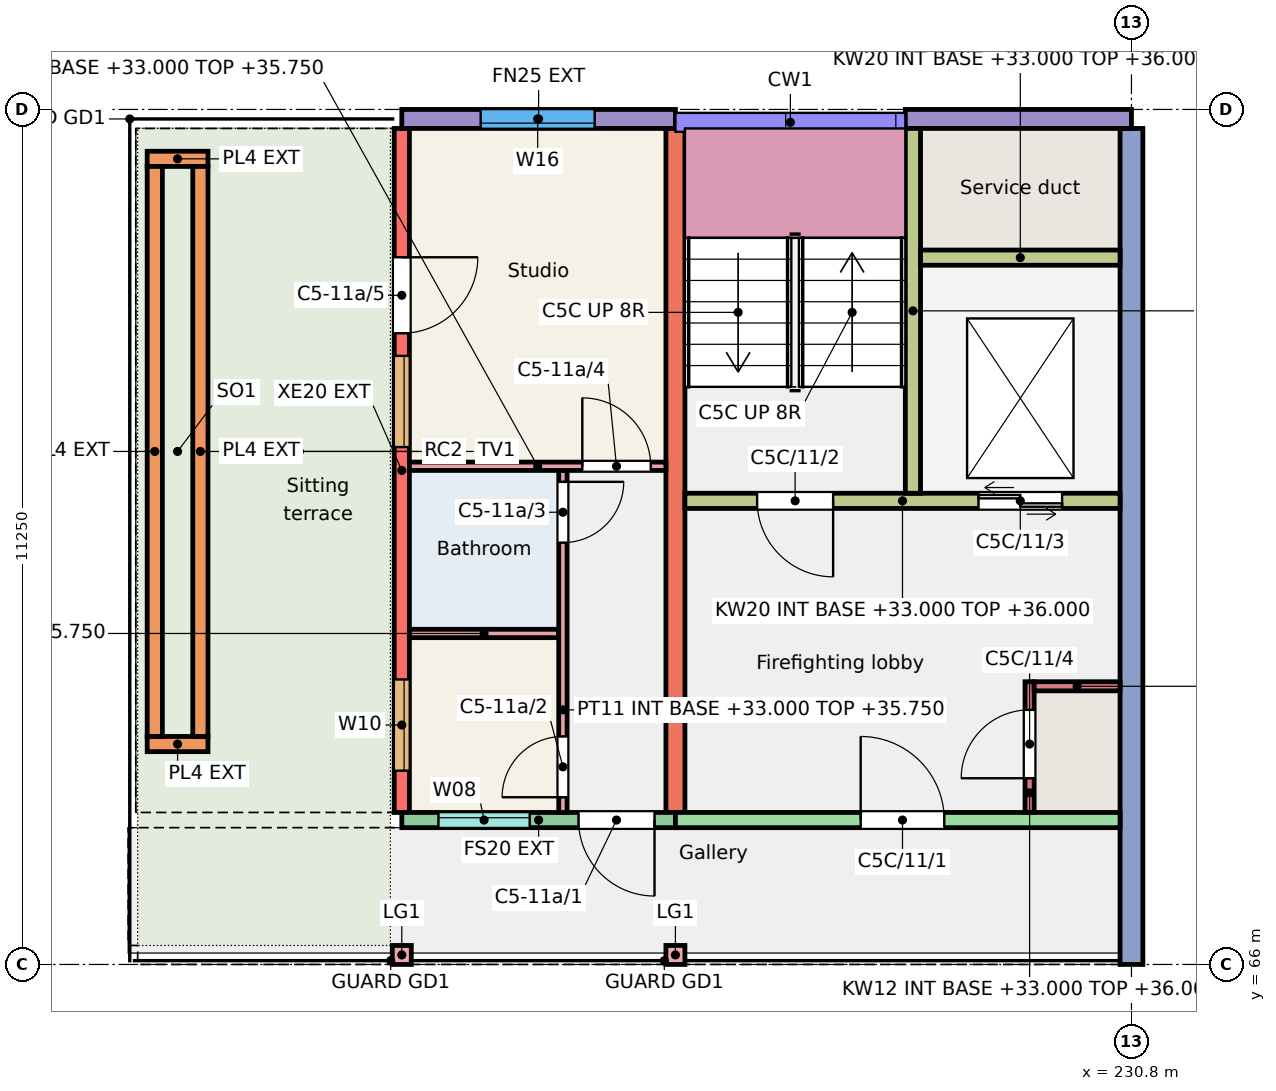
"""IFC4 building model, lengths in metres.
Left out: names, types, materials, properties, quantities, classifications, styles, units other than length and angle.
Written with IfcOpenShell. Run it as: python <this file> out.ifc"""

import sys

from ifc_helpers import new_model, si_unit, direction, frame, frame_2d, origin, origin_2d, place, context, subcontext, project, spatial, rectangle, extrude, element, fill, save


model = new_model("IFC4")
c1 = context("Model", 3, precision=1e-05, world=origin(), true_north=direction((0.0, 1.0)))
c2 = subcontext(c1, "Body", "Model", "MODEL_VIEW")
j1 = project(units=[si_unit("LENGTHUNIT", "METRE"), si_unit("PLANEANGLEUNIT", "RADIAN")], contexts=[c1])
p1 = place(None, origin())
s1 = spatial("IfcSite", under=j1, at=p1, CompositionType="ELEMENT")
p2 = place(p1, origin())
s2 = spatial("IfcBuilding", under=s1, at=p2, CompositionType="ELEMENT")
p3 = place(p2, frame((0.0, 0.0, 33.0)))
s3 = spatial("IfcBuildingStorey", under=s2, at=p3, CompositionType="ELEMENT", Elevation=33.0)
p4 = place(p3, frame((221.2, 68.0, 0.0), z_axis=(0.0, 0.0, 1.0), x_axis=(0.0, 1.0, 0.0)))
e1 = element("IfcWall", 1, at=p4, inside=s3, PredefinedType="SHEAR", context=c2, shape_type="SweptSolid", body=[
    extrude(rectangle(XDim=9.0, YDim=0.2, at=frame_2d((4.5, 0.0))), origin(), (0.0, 0.0, 1.0), 3.0),
])
p5 = place(p4, frame((0.55, 0.0, 0.9)))
e2 = element("IfcOpeningElement", 2, at=p5, cuts=e1, PredefinedType="OPENING", context=c2, shape_type="SweptSolid", body=[
    extrude(rectangle(XDim=1.2, YDim=1.5, at=frame_2d((0.6, 0.75))), frame((0.0, 0.11, 0.0), z_axis=(0.0, -1.0, 0.0), x_axis=(1.0, 0.0, 0.0)), (0.0, 0.0, 1.0), 0.22),
])
p6 = place(p4, frame((4.808, 0.0, 0.9)))
e3 = element("IfcOpeningElement", 3, at=p6, cuts=e1, PredefinedType="OPENING", context=c2, shape_type="SweptSolid", body=[
    extrude(rectangle(XDim=1.2, YDim=1.5, at=frame_2d((0.6, 0.75))), frame((0.0, 0.11, 0.0), z_axis=(0.0, -1.0, 0.0), x_axis=(1.0, 0.0, 0.0)), (0.0, 0.0, 1.0), 0.22),
])
p7 = place(p4, frame((6.305, 0.0, 0.0)))
e4 = element("IfcOpeningElement", 4, at=p7, cuts=e1, PredefinedType="OPENING", context=c2, shape_type="SweptSolid", body=[
    extrude(rectangle(XDim=1.0, YDim=2.1, at=frame_2d((0.5, 1.05))), frame((0.0, 0.11, 0.0), z_axis=(0.0, -1.0, 0.0), x_axis=(1.0, 0.0, 0.0)), (0.0, 0.0, 1.0), 0.22),
])
p8 = place(p3, frame((224.8, 68.0, 0.0), z_axis=(0.0, 0.0, 1.0), x_axis=(0.0, 1.0, 0.0)))
e5 = element("IfcWall", 5, at=p8, inside=s3, PredefinedType="SHEAR", context=c2, shape_type="SweptSolid", body=[
    extrude(rectangle(XDim=9.0, YDim=0.25, at=frame_2d((4.5, 0.0))), origin(), (0.0, 0.0, 1.0), 3.0),
])
p9 = place(p3, frame((230.8, 66.0, 0.0), z_axis=(0.0, 0.0, 1.0), x_axis=(0.0, 1.0, 0.0)))
e6 = element("IfcWall", 6, at=p9, inside=s3, PredefinedType="SHEAR", context=c2, shape_type="SweptSolid", body=[
    extrude(rectangle(XDim=11.0, YDim=0.3, at=frame_2d((5.5, 0.0))), origin(), (0.0, 0.0, 1.0), 3.0),
])
p10 = place(p3, frame((221.2, 77.125, 0.0), z_axis=(0.0, 0.0, 1.0), x_axis=(1.0, 0.0, 0.0)))
e7 = element("IfcWall", 7, at=p10, inside=s3, PredefinedType="SOLIDWALL", context=c2, shape_type="SweptSolid", body=[
    extrude(rectangle(XDim=3.6, YDim=0.25, at=frame_2d((1.8, 0.0))), origin(), (0.0, 0.0, 1.0), 3.0),
])
p11 = place(p10, frame((1.038, 0.0, 0.9)))
e8 = element("IfcOpeningElement", 8, at=p11, cuts=e7, PredefinedType="OPENING", context=c2, shape_type="SweptSolid", body=[
    extrude(rectangle(XDim=1.5, YDim=1.5, at=frame_2d((0.75, 0.75))), frame((0.0, 0.135, 0.0), z_axis=(0.0, -1.0, 0.0), x_axis=(1.0, 0.0, 0.0)), (0.0, 0.0, 1.0), 0.27),
])
p12 = place(p3, frame((221.2, 67.9, 0.0), z_axis=(0.0, 0.0, 1.0), x_axis=(1.0, 0.0, 0.0)))
e9 = element("IfcWall", 9, at=p12, inside=s3, PredefinedType="SOLIDWALL", context=c2, shape_type="SweptSolid", body=[
    extrude(rectangle(XDim=3.6, YDim=0.2, at=frame_2d((1.8, 0.0))), origin(), (0.0, 0.0, 1.0), 3.0),
])
p13 = place(p12, frame((0.482, 0.0, 1.1)))
e10 = element("IfcOpeningElement", 10, at=p13, cuts=e9, PredefinedType="OPENING", context=c2, shape_type="SweptSolid", body=[
    extrude(rectangle(XDim=1.2, YDim=1.3, at=frame_2d((0.6, 0.65))), frame((0.0, 0.11, 0.0), z_axis=(0.0, -1.0, 0.0), x_axis=(1.0, 0.0, 0.0)), (0.0, 0.0, 1.0), 0.22),
])
p14 = place(p12, frame((2.325, 0.0, 0.0)))
e11 = element("IfcOpeningElement", 11, at=p14, cuts=e9, PredefinedType="OPENING", context=c2, shape_type="SweptSolid", body=[
    extrude(rectangle(XDim=1.0, YDim=2.1, at=frame_2d((0.5, 1.05))), frame((0.0, 0.11, 0.0), z_axis=(0.0, -1.0, 0.0), x_axis=(1.0, 0.0, 0.0)), (0.0, 0.0, 1.0), 0.22),
])
p15 = place(p3, frame((227.825, 77.125, 0.0), z_axis=(0.0, 0.0, 1.0), x_axis=(1.0, 0.0, 0.0)))
e12 = element("IfcWall", 12, at=p15, inside=s3, PredefinedType="SOLIDWALL", context=c2, shape_type="SweptSolid", body=[
    extrude(rectangle(XDim=2.975, YDim=0.25, at=frame_2d((1.488, 0.0))), origin(), (0.0, 0.0, 1.0), 3.0),
])
p16 = place(p3, frame((224.8, 67.9, 0.0), z_axis=(0.0, 0.0, 1.0), x_axis=(1.0, 0.0, 0.0)))
e13 = element("IfcWall", 13, at=p16, inside=s3, PredefinedType="SHEAR", context=c2, shape_type="SweptSolid", body=[
    extrude(rectangle(XDim=5.85, YDim=0.2, at=frame_2d((2.925, 0.0))), origin(), (0.0, 0.0, 1.0), 3.0),
])
p17 = place(p16, frame((2.438, 0.0, 0.0)))
e14 = element("IfcOpeningElement", 14, at=p17, cuts=e13, PredefinedType="OPENING", context=c2, shape_type="SweptSolid", body=[
    extrude(rectangle(XDim=1.1, YDim=2.1, at=frame_2d((0.55, 1.05))), frame((0.0, 0.11, 0.0), z_axis=(0.0, -1.0, 0.0), x_axis=(1.0, 0.0, 0.0)), (0.0, 0.0, 1.0), 0.22),
])
p18 = place(p3, frame((224.925, 72.1, 0.0), z_axis=(0.0, 0.0, 1.0), x_axis=(1.0, 0.0, 0.0)))
e15 = element("IfcWall", 15, at=p18, inside=s3, PredefinedType="SHEAR", context=c2, shape_type="SweptSolid", body=[
    extrude(rectangle(XDim=5.725, YDim=0.2, at=frame_2d((2.862, 0.0))), origin(), (0.0, 0.0, 1.0), 3.0),
])
p19 = place(p18, frame((0.95, 0.0, 0.0)))
e16 = element("IfcOpeningElement", 16, at=p19, cuts=e15, PredefinedType="OPENING", context=c2, shape_type="SweptSolid", body=[
    extrude(rectangle(XDim=1.0, YDim=2.1, at=frame_2d((0.5, 1.05))), frame((0.0, 0.11, 0.0), z_axis=(0.0, -1.0, 0.0), x_axis=(1.0, 0.0, 0.0)), (0.0, 0.0, 1.0), 0.22),
])
p20 = place(p18, frame((3.863, 0.0, 0.0)))
e17 = element("IfcOpeningElement", 17, at=p20, cuts=e15, PredefinedType="OPENING", context=c2, shape_type="SweptSolid", body=[
    extrude(rectangle(XDim=1.1, YDim=2.1, at=frame_2d((0.55, 1.05))), frame((0.0, 0.11, 0.0), z_axis=(0.0, -1.0, 0.0), x_axis=(1.0, 0.0, 0.0)), (0.0, 0.0, 1.0), 0.22),
])
p21 = place(p3, frame((227.925, 72.2, 0.0), z_axis=(0.0, 0.0, 1.0), x_axis=(0.0, 1.0, 0.0)))
e18 = element("IfcWall", 18, at=p21, inside=s3, PredefinedType="SHEAR", context=c2, shape_type="SweptSolid", body=[
    extrude(rectangle(XDim=4.8, YDim=0.2, at=frame_2d((2.4, 0.0))), origin(), (0.0, 0.0, 1.0), 3.0),
])
p22 = place(p3, frame((228.025, 75.3, 0.0), z_axis=(0.0, 0.0, 1.0), x_axis=(1.0, 0.0, 0.0)))
e19 = element("IfcWall", 19, at=p22, inside=s3, PredefinedType="SHEAR", context=c2, shape_type="SweptSolid", body=[
    extrude(rectangle(XDim=2.625, YDim=0.2, at=frame_2d((1.312, 0.0))), origin(), (0.0, 0.0, 1.0), 3.0),
])
p23 = place(p3, frame((229.46, 68.0, 0.0), z_axis=(0.0, 0.0, 1.0), x_axis=(0.0, 1.0, 0.0)))
e20 = element("IfcWall", 20, at=p23, inside=s3, PredefinedType="SHEAR", context=c2, shape_type="SweptSolid", body=[
    extrude(rectangle(XDim=1.72, YDim=0.12, at=frame_2d((0.86, 0.0))), origin(), (0.0, 0.0, 1.0), 3.0),
])
p24 = place(p23, frame((0.45, 0.0, 0.0)))
e21 = element("IfcOpeningElement", 21, at=p24, cuts=e20, PredefinedType="OPENING", context=c2, shape_type="SweptSolid", body=[
    extrude(rectangle(XDim=0.9, YDim=2.1, at=frame_2d((0.45, 1.05))), frame((0.0, 0.07, 0.0), z_axis=(0.0, -1.0, 0.0), x_axis=(1.0, 0.0, 0.0)), (0.0, 0.0, 1.0), 0.14),
])
p25 = place(p3, frame((229.52, 69.66, 0.0), z_axis=(0.0, 0.0, 1.0), x_axis=(1.0, 0.0, 0.0)))
e22 = element("IfcWall", 22, at=p25, inside=s3, PredefinedType="SHEAR", context=c2, shape_type="SweptSolid", body=[
    extrude(rectangle(XDim=1.13, YDim=0.12, at=frame_2d((0.565, 0.0))), origin(), (0.0, 0.0, 1.0), 3.0),
])
for number, where, z_axis, x_axis in (
    (23, (221.2, 66.125, 0.0), (0.0, 0.0, 1.0), (1.0, 0.0, 0.0)),
    (24, (224.8, 66.125, 0.0), (0.0, 0.0, 1.0), (1.0, 0.0, 0.0)),
):
    element("IfcColumn", number, at=place(p3, frame(where, z_axis=z_axis, x_axis=x_axis)), inside=s3, PredefinedType="COLUMN", context=c2, shape_type="SweptSolid", body=[
        extrude(rectangle(XDim=0.25, YDim=0.25, at=origin_2d()), origin(), (0.0, 0.0, 1.0), 3.0),
    ])
for number, where, z_axis, x_axis in (
    (25, (217.85, 68.9, 0.01), (0.0, 0.0, 1.0), (1.0, 0.0, 0.0)),
    (26, (217.85, 76.6, 0.01), (0.0, 0.0, 1.0), (1.0, 0.0, 0.0)),
):
    element("IfcWall", number, at=place(p3, frame(where, z_axis=z_axis, x_axis=x_axis)), inside=s3, PredefinedType="SOLIDWALL", context=c2, shape_type="SweptSolid", body=[
        extrude(rectangle(XDim=0.8, YDim=0.2, at=frame_2d((0.4, 0.0))), origin(), (0.0, 0.0, 1.0), 0.45),
    ])
for number, where, z_axis, x_axis in (
    (27, (217.95, 69.0, 0.01), (0.0, 0.0, 1.0), (0.0, 1.0, 0.0)),
    (28, (218.55, 69.0, 0.01), (0.0, 0.0, 1.0), (0.0, 1.0, 0.0)),
):
    element("IfcWall", number, at=place(p3, frame(where, z_axis=z_axis, x_axis=x_axis)), inside=s3, PredefinedType="SOLIDWALL", context=c2, shape_type="SweptSolid", body=[
        extrude(rectangle(XDim=7.5, YDim=0.2, at=frame_2d((3.75, 0.0))), origin(), (0.0, 0.0, 1.0), 0.45),
    ])
p26 = place(p3, frame((221.3, 70.355, 0.0), z_axis=(0.0, 0.0, 1.0), x_axis=(1.0, 0.0, 0.0)))
e29 = element("IfcWall", 29, at=p26, inside=s3, PredefinedType="PARTITIONING", context=c2, shape_type="SweptSolid", body=[
    extrude(rectangle(XDim=1.965, YDim=0.11, at=frame_2d((0.982, 0.0))), origin(), (0.0, 0.0, 1.0), 2.75),
])
p27 = place(p3, frame((223.32, 68.0, 0.0), z_axis=(0.0, 0.0, 1.0), x_axis=(0.0, 1.0, 0.0)))
e30 = element("IfcWall", 30, at=p27, inside=s3, PredefinedType="PARTITIONING", context=c2, shape_type="SweptSolid", body=[
    extrude(rectangle(XDim=4.5, YDim=0.11, at=frame_2d((2.25, 0.0))), origin(), (0.0, 0.0, 1.0), 2.75),
])
p28 = place(p27, frame((0.2, 0.0, 0.0)))
e31 = element("IfcOpeningElement", 31, at=p28, cuts=e30, PredefinedType="OPENING", context=c2, shape_type="SweptSolid", body=[
    extrude(rectangle(XDim=0.8, YDim=2.1, at=frame_2d((0.4, 1.05))), frame((0.0, 0.065, 0.0), z_axis=(0.0, -1.0, 0.0), x_axis=(1.0, 0.0, 0.0)), (0.0, 0.0, 1.0), 0.13),
])
p29 = place(p27, frame((3.55, 0.0, 0.0)))
e32 = element("IfcOpeningElement", 32, at=p29, cuts=e30, PredefinedType="OPENING", context=c2, shape_type="SweptSolid", body=[
    extrude(rectangle(XDim=0.8, YDim=2.1, at=frame_2d((0.4, 1.05))), frame((0.0, 0.065, 0.0), z_axis=(0.0, -1.0, 0.0), x_axis=(1.0, 0.0, 0.0)), (0.0, 0.0, 1.0), 0.13),
])
p30 = place(p3, frame((221.3, 72.555, 0.0), z_axis=(0.0, 0.0, 1.0), x_axis=(1.0, 0.0, 0.0)))
e33 = element("IfcWall", 33, at=p30, inside=s3, PredefinedType="PARTITIONING", context=c2, shape_type="SweptSolid", body=[
    extrude(rectangle(XDim=3.375, YDim=0.11, at=frame_2d((1.688, 0.0))), origin(), (0.0, 0.0, 1.0), 2.75),
])
p31 = place(p30, frame((2.275, 0.0, 0.0)))
e34 = element("IfcOpeningElement", 34, at=p31, cuts=e33, PredefinedType="OPENING", context=c2, shape_type="SweptSolid", body=[
    extrude(rectangle(XDim=0.9, YDim=2.1, at=frame_2d((0.45, 1.05))), frame((0.0, 0.065, 0.0), z_axis=(0.0, -1.0, 0.0), x_axis=(1.0, 0.0, 0.0)), (0.0, 0.0, 1.0), 0.13),
])
p32 = place(p13, origin())
e35 = element("IfcWindow", 35, at=p32, inside=s3, PartitioningType="SINGLE_PANEL", PredefinedType="WINDOW", context=c2, shape_type="SweptSolid", body=[
    extrude(rectangle(XDim=1.2, YDim=1.3, at=frame_2d((0.6, 0.65))), frame((0.0, 0.06, 0.0), z_axis=(0.0, -1.0, 0.0), x_axis=(1.0, 0.0, 0.0)), (0.0, 0.0, 1.0), 0.06),
])
fill(e10, e35)
p33 = place(p11, origin())
e36 = element("IfcWindow", 36, at=p33, inside=s3, PartitioningType="SINGLE_PANEL", PredefinedType="WINDOW", context=c2, shape_type="SweptSolid", body=[
    extrude(rectangle(XDim=1.5, YDim=1.5, at=frame_2d((0.75, 0.75))), frame((0.0, -0.025, 0.0), z_axis=(0.0, -1.0, 0.0), x_axis=(1.0, 0.0, 0.0)), (0.0, 0.0, 1.0), 0.06),
])
fill(e8, e36)
p34 = place(p5, origin())
e37 = element("IfcWindow", 37, at=p34, inside=s3, PartitioningType="SINGLE_PANEL", PredefinedType="WINDOW", context=c2, shape_type="SweptSolid", body=[
    extrude(rectangle(XDim=1.2, YDim=1.5, at=frame_2d((0.6, 0.75))), frame((0.0, 0.0, 0.0), z_axis=(0.0, -1.0, 0.0), x_axis=(1.0, 0.0, 0.0)), (0.0, 0.0, 1.0), 0.06),
])
fill(e2, e37)
p35 = place(p6, origin())
e38 = element("IfcWindow", 38, at=p35, inside=s3, PartitioningType="SINGLE_PANEL", PredefinedType="WINDOW", context=c2, shape_type="SweptSolid", body=[
    extrude(rectangle(XDim=1.2, YDim=1.5, at=frame_2d((0.6, 0.75))), frame((0.0, 0.0, 0.0), z_axis=(0.0, -1.0, 0.0), x_axis=(1.0, 0.0, 0.0)), (0.0, 0.0, 1.0), 0.06),
])
fill(e3, e38)
p36 = place(p14, origin())
e39 = element("IfcDoor", 39, at=p36, inside=s3, OperationType="SINGLE_SWING_RIGHT", PredefinedType="DOOR", context=c2, shape_type="SweptSolid", body=[
    extrude(rectangle(XDim=1.0, YDim=2.1, at=frame_2d((0.5, 1.05))), frame((0.0, 0.025, 0.0), z_axis=(0.0, -1.0, 0.0), x_axis=(1.0, 0.0, 0.0)), (0.0, 0.0, 1.0), 0.05),
])
fill(e11, e39)
p37 = place(p28, origin())
e40 = element("IfcDoor", 40, at=p37, inside=s3, OperationType="SINGLE_SWING_LEFT", PredefinedType="DOOR", context=c2, shape_type="SweptSolid", body=[
    extrude(rectangle(XDim=0.8, YDim=2.1, at=frame_2d((0.4, 1.05))), frame((0.0, 0.025, 0.0), z_axis=(0.0, -1.0, 0.0), x_axis=(1.0, 0.0, 0.0)), (0.0, 0.0, 1.0), 0.05),
])
fill(e31, e40)
p38 = place(p29, origin())
e41 = element("IfcDoor", 41, at=p38, inside=s3, OperationType="SINGLE_SWING_RIGHT", PredefinedType="DOOR", context=c2, shape_type="SweptSolid", body=[
    extrude(rectangle(XDim=0.8, YDim=2.1, at=frame_2d((0.4, 1.05))), frame((0.0, 0.025, 0.0), z_axis=(0.0, -1.0, 0.0), x_axis=(1.0, 0.0, 0.0)), (0.0, 0.0, 1.0), 0.05),
])
fill(e32, e41)
p39 = place(p31, origin())
e42 = element("IfcDoor", 42, at=p39, inside=s3, OperationType="SINGLE_SWING_LEFT", PredefinedType="DOOR", context=c2, shape_type="SweptSolid", body=[
    extrude(rectangle(XDim=0.9, YDim=2.1, at=frame_2d((0.45, 1.05))), frame((0.0, 0.025, 0.0), z_axis=(0.0, -1.0, 0.0), x_axis=(1.0, 0.0, 0.0)), (0.0, 0.0, 1.0), 0.05),
])
fill(e34, e42)
p40 = place(p7, origin())
e43 = element("IfcDoor", 43, at=p40, inside=s3, OperationType="SINGLE_SWING_RIGHT", PredefinedType="DOOR", context=c2, shape_type="SweptSolid", body=[
    extrude(rectangle(XDim=1.0, YDim=2.1, at=frame_2d((0.5, 1.05))), frame((0.0, 0.025, 0.0), z_axis=(0.0, -1.0, 0.0), x_axis=(1.0, 0.0, 0.0)), (0.0, 0.0, 1.0), 0.05),
])
fill(e4, e43)
p41 = place(p17, origin())
e44 = element("IfcDoor", 44, at=p41, inside=s3, OperationType="SINGLE_SWING_LEFT", PredefinedType="DOOR", context=c2, shape_type="SweptSolid", body=[
    extrude(rectangle(XDim=1.1, YDim=2.1, at=frame_2d((0.55, 1.05))), frame((0.0, 0.025, 0.0), z_axis=(0.0, -1.0, 0.0), x_axis=(1.0, 0.0, 0.0)), (0.0, 0.0, 1.0), 0.05),
])
fill(e14, e44)
p42 = place(p19, origin())
e45 = element("IfcDoor", 45, at=p42, inside=s3, OperationType="SINGLE_SWING_RIGHT", PredefinedType="DOOR", context=c2, shape_type="SweptSolid", body=[
    extrude(rectangle(XDim=1.0, YDim=2.1, at=frame_2d((0.5, 1.05))), frame((0.0, 0.025, 0.0), z_axis=(0.0, -1.0, 0.0), x_axis=(1.0, 0.0, 0.0)), (0.0, 0.0, 1.0), 0.05),
])
fill(e16, e45)
p43 = place(p20, origin())
e46 = element("IfcDoor", 46, at=p43, inside=s3, OperationType="DOUBLE_DOOR_SLIDING", PredefinedType="DOOR", context=c2, shape_type="SweptSolid", body=[
    extrude(rectangle(XDim=1.1, YDim=2.1, at=frame_2d((0.55, 1.05))), frame((0.0, 0.025, 0.0), z_axis=(0.0, -1.0, 0.0), x_axis=(1.0, 0.0, 0.0)), (0.0, 0.0, 1.0), 0.05),
])
fill(e17, e46)
p44 = place(p24, origin())
e47 = element("IfcDoor", 47, at=p44, inside=s3, OperationType="SINGLE_SWING_LEFT", PredefinedType="DOOR", context=c2, shape_type="SweptSolid", body=[
    extrude(rectangle(XDim=0.9, YDim=2.1, at=frame_2d((0.45, 1.05))), frame((0.0, 0.025, 0.0), z_axis=(0.0, -1.0, 0.0), x_axis=(1.0, 0.0, 0.0)), (0.0, 0.0, 1.0), 0.05),
])
fill(e21, e47)
save(model, sys.argv[1])
